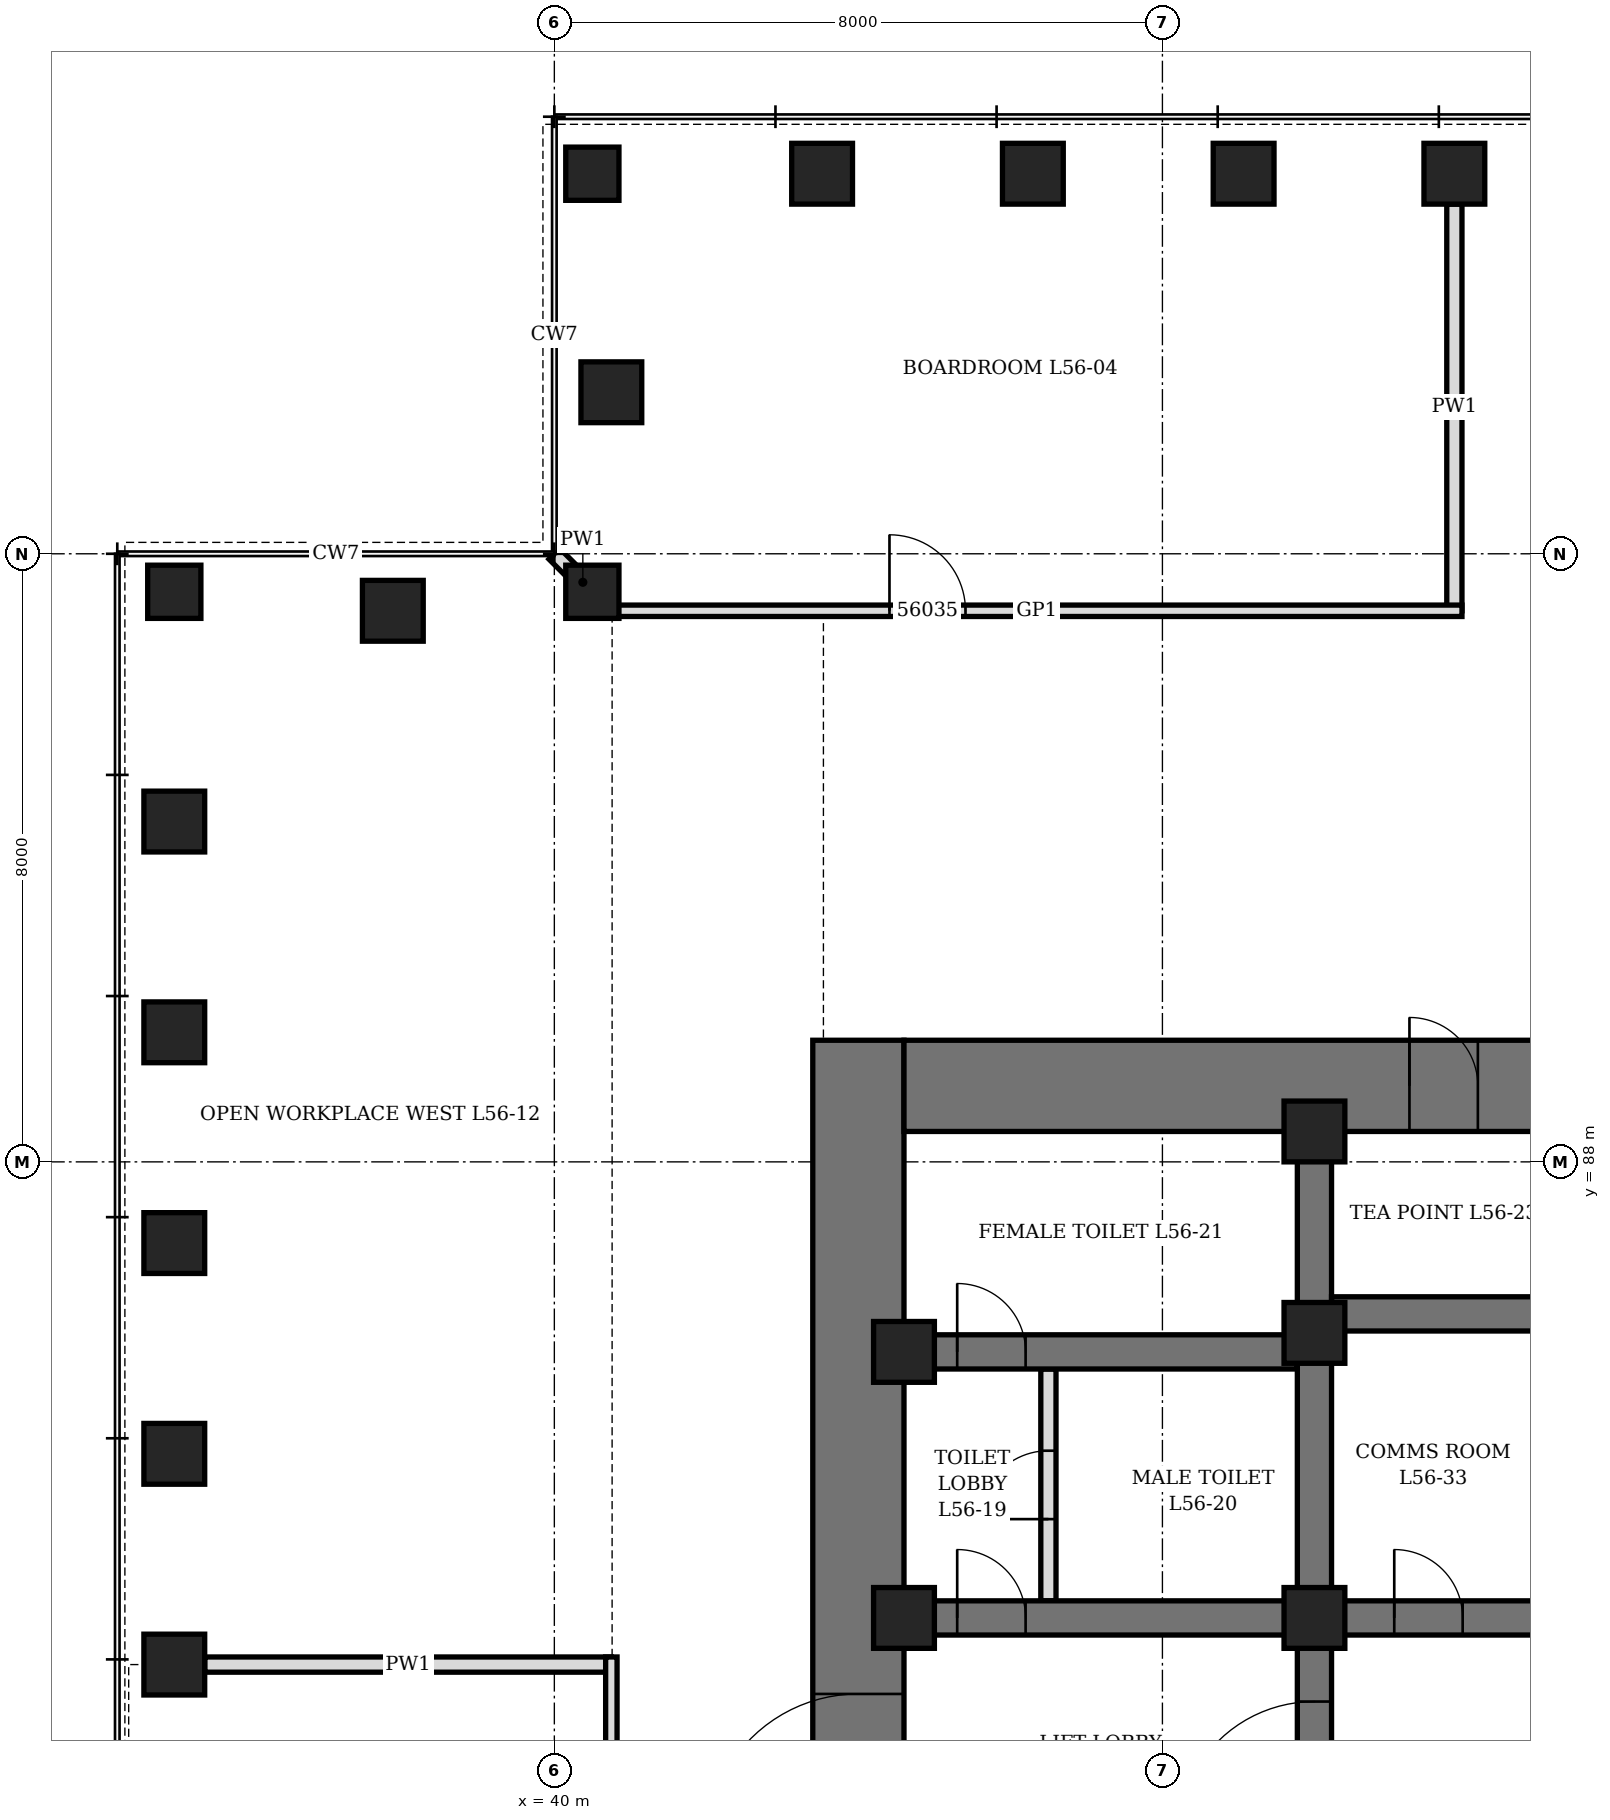
"""IFC4 building model, lengths in metres.
Left out: names, types, materials, properties, quantities, classifications, styles, units other than length and angle.
Written with IfcOpenShell. Run it as: python <this file> out.ifc"""

import sys

from ifc_helpers import new_model, si_unit, direction, frame, frame_2d, origin, origin_2d, place, context, subcontext, project, spatial, rectangle, hollow_rectangle, extrude, clip, halfspace, element, fill, save


model = new_model("IFC4")
c1 = context("Model", 3, precision=1e-05, world=origin(), true_north=direction((0.0, 1.0)))
c2 = subcontext(c1, "Body", "Model", "MODEL_VIEW")
j1 = project(units=[si_unit("LENGTHUNIT", "METRE"), si_unit("PLANEANGLEUNIT", "RADIAN")], contexts=[c1])
p1 = place(None, origin())
s1 = spatial("IfcSite", under=j1, at=p1, CompositionType="ELEMENT")
p2 = place(p1, origin())
s2 = spatial("IfcBuilding", under=s1, at=p2, CompositionType="ELEMENT")
p3 = place(p2, frame((0.0, 0.0, 250.3)))
s3 = spatial("IfcBuildingStorey", under=s2, at=p3, CompositionType="ELEMENT", Elevation=250.3)
for number, where, z_axis, x_axis in (
    (1, (51.841, 101.0, -0.16), (0.0, 0.0, 1.0), (1.0, 0.0, 0.0)),
    (2, (49.068, 101.0, -0.16), (0.0, 0.0, 1.0), (1.0, 0.0, 0.0)),
    (3, (46.295, 101.0, -0.16), (0.0, 0.0, 1.0), (1.0, 0.0, 0.0)),
    (4, (43.523, 101.0, -0.16), (0.0, 0.0, 1.0), (1.0, 0.0, 0.0)),
):
    element("IfcColumn", number, at=place(p3, frame(where, z_axis=z_axis, x_axis=x_axis)), inside=s3, PredefinedType="COLUMN", context=c2, shape_type="SweptSolid", body=[
        extrude(hollow_rectangle(XDim=0.8, YDim=0.8, WallThickness=0.1, at=origin_2d()), origin(), (0.0, 0.0, 1.0), 4.36),
    ])
p4 = place(p3, frame((40.5, 101.0, -0.16), z_axis=(0.057244014902, 0.0, 0.998360216935), x_axis=(0.0, 1.0, 0.0)))
e5 = element("IfcColumn", 5, at=p4, inside=s3, PredefinedType="COLUMN", context=c2, shape_type="Clipping", body=[
    clip(clip(extrude(hollow_rectangle(XDim=0.7, YDim=0.7, WallThickness=0.08, at=origin_2d()), origin(), (0.0, 0.0, 1.0), 4.367), halfspace(frame((0.0, 0.0, 0.022), z_axis=(0.0, 0.0, 1.0), x_axis=(1.0, 0.0, 0.0)), True)), halfspace(frame((0.0, 0.0, 4.345), z_axis=(0.0, 0.0, -1.0), x_axis=(1.0, 0.0, 0.0)), True)),
])
p5 = place(p3, frame((40.75, 98.125, -0.16), z_axis=(0.0, 0.0, 1.0), x_axis=(0.0, 1.0, 0.0)))
e6 = element("IfcColumn", 6, at=p5, inside=s3, PredefinedType="COLUMN", context=c2, shape_type="SweptSolid", body=[
    extrude(hollow_rectangle(XDim=0.8, YDim=0.8, WallThickness=0.1, at=origin_2d()), origin(), (0.0, 0.0, 1.0), 4.36),
])
p6 = place(p3, frame((40.5, 95.5, -0.16), z_axis=(0.057150453976, -0.057150453976, 0.99672847417), x_axis=(0.707106781187, 0.707106781187, 0.0)))
e7 = element("IfcColumn", 7, at=p6, inside=s3, PredefinedType="COLUMN", context=c2, shape_type="Clipping", body=[
    clip(clip(extrude(hollow_rectangle(XDim=0.7, YDim=0.7, WallThickness=0.08, at=origin_2d()), origin(), (0.0, 0.0, 1.0), 4.375), halfspace(frame((0.0, 0.0, 0.031), z_axis=(0.0, 0.0, 1.0), x_axis=(1.0, 0.0, 0.0)), True)), halfspace(frame((0.0, 0.0, 4.344), z_axis=(0.0, 0.0, -1.0), x_axis=(1.0, 0.0, 0.0)), True)),
])
p7 = place(p3, frame((37.875, 95.25, -0.16), z_axis=(0.0, 0.0, 1.0), x_axis=(1.0, 0.0, 0.0)))
e8 = element("IfcColumn", 8, at=p7, inside=s3, PredefinedType="COLUMN", context=c2, shape_type="SweptSolid", body=[
    extrude(hollow_rectangle(XDim=0.8, YDim=0.8, WallThickness=0.1, at=origin_2d()), origin(), (0.0, 0.0, 1.0), 4.36),
])
p8 = place(p3, frame((35.0, 95.5, -0.16), z_axis=(0.0, -0.057244014902, 0.998360216935), x_axis=(1.0, 0.0, 0.0)))
e9 = element("IfcColumn", 9, at=p8, inside=s3, PredefinedType="COLUMN", context=c2, shape_type="Clipping", body=[
    clip(clip(extrude(hollow_rectangle(XDim=0.7, YDim=0.7, WallThickness=0.08, at=origin_2d()), origin(), (0.0, 0.0, 1.0), 4.367), halfspace(frame((0.0, 0.0, 0.022), z_axis=(0.0, 0.0, 1.0), x_axis=(1.0, 0.0, 0.0)), True)), halfspace(frame((0.0, 0.0, 4.345), z_axis=(0.0, 0.0, -1.0), x_axis=(1.0, 0.0, 0.0)), True)),
])
for number, where, z_axis, x_axis in (
    (10, (35.0, 92.477, -0.16), (0.0, 0.0, 1.0), (0.0, 1.0, 0.0)),
    (11, (35.0, 89.705, -0.16), (0.0, 0.0, 1.0), (0.0, 1.0, 0.0)),
    (12, (35.0, 86.932, -0.16), (0.0, 0.0, 1.0), (0.0, 1.0, 0.0)),
    (13, (35.0, 84.159, -0.16), (0.0, 0.0, 1.0), (0.0, 1.0, 0.0)),
    (14, (35.0, 81.386, -0.16), (0.0, 0.0, 1.0), (0.0, 1.0, 0.0)),
):
    element("IfcColumn", number, at=place(p3, frame(where, z_axis=z_axis, x_axis=x_axis)), inside=s3, PredefinedType="COLUMN", context=c2, shape_type="SweptSolid", body=[
        extrude(hollow_rectangle(XDim=0.8, YDim=0.8, WallThickness=0.1, at=origin_2d()), origin(), (0.0, 0.0, 1.0), 4.36),
    ])
p9 = place(p3, frame((44.0, 70.4, 0.0), z_axis=(0.0, 0.0, 1.0), x_axis=(0.0, 1.0, 0.0)))
e15 = element("IfcWall", 15, at=p9, inside=s3, PredefinedType="SHEAR", context=c2, shape_type="SweptSolid", body=[
    extrude(rectangle(XDim=19.2, YDim=1.2, at=frame_2d((9.6, 0.0))), origin(), (0.0, 0.0, 1.0), 4.2),
])
p10 = place(p9, frame((8.6, 0.0, 0.0)))
e16 = element("IfcOpeningElement", 16, at=p10, cuts=e15, PredefinedType="OPENING", context=c2, shape_type="SweptSolid", body=[
    extrude(rectangle(XDim=2.0, YDim=2.4, at=frame_2d((1.0, 1.2))), frame((0.0, 0.61, 0.0), z_axis=(0.0, -1.0, 0.0), x_axis=(1.0, 0.0, 0.0)), (0.0, 0.0, 1.0), 1.22),
])
p11 = place(p3, frame((44.6, 89.0, 0.0), z_axis=(0.0, 0.0, 1.0), x_axis=(1.0, 0.0, 0.0)))
e17 = element("IfcWall", 17, at=p11, inside=s3, PredefinedType="SHEAR", context=c2, shape_type="SweptSolid", body=[
    extrude(rectangle(XDim=22.8, YDim=1.2, at=frame_2d((11.4, 0.0))), origin(), (0.0, 0.0, 1.0), 4.2),
])
p12 = place(p11, frame((9.475, 0.0, 0.0)))
e18 = element("IfcOpeningElement", 18, at=p12, cuts=e17, PredefinedType="OPENING", context=c2, shape_type="SweptSolid", body=[
    extrude(rectangle(XDim=1.0, YDim=2.1, at=frame_2d((0.5, 1.05))), frame((0.0, 0.61, 0.0), z_axis=(0.0, -1.0, 0.0), x_axis=(1.0, 0.0, 0.0)), (0.0, 0.0, 1.0), 1.22),
])
p13 = place(p11, frame((6.65, 0.0, 0.0)))
e19 = element("IfcOpeningElement", 19, at=p13, cuts=e17, PredefinedType="OPENING", context=c2, shape_type="SweptSolid", body=[
    extrude(rectangle(XDim=0.9, YDim=2.1, at=frame_2d((0.45, 1.05))), frame((0.0, 0.61, 0.0), z_axis=(0.0, -1.0, 0.0), x_axis=(1.0, 0.0, 0.0)), (0.0, 0.0, 1.0), 1.22),
])
p14 = place(p11, frame((13.012, 0.0, 0.0)))
e20 = element("IfcOpeningElement", 20, at=p14, cuts=e17, PredefinedType="OPENING", context=c2, shape_type="SweptSolid", body=[
    extrude(rectangle(XDim=0.9, YDim=2.1, at=frame_2d((0.45, 1.05))), frame((0.0, 0.61, 0.0), z_axis=(0.0, -1.0, 0.0), x_axis=(1.0, 0.0, 0.0)), (0.0, 0.0, 1.0), 1.22),
])
p15 = place(p3, frame((50.0, 71.6, 0.0), z_axis=(0.0, 0.0, 1.0), x_axis=(0.0, 1.0, 0.0)))
e21 = element("IfcWall", 21, at=p15, inside=s3, PredefinedType="SHEAR", context=c2, shape_type="SweptSolid", body=[
    extrude(rectangle(XDim=16.8, YDim=0.45, at=frame_2d((8.4, 0.0))), origin(), (0.0, 0.0, 1.0), 4.2),
])
p16 = place(p15, frame((7.5, 0.0, 0.0)))
e22 = element("IfcOpeningElement", 22, at=p16, cuts=e21, PredefinedType="OPENING", context=c2, shape_type="SweptSolid", body=[
    extrude(rectangle(XDim=1.8, YDim=2.4, at=frame_2d((0.9, 1.2))), frame((0.0, 0.235, 0.0), z_axis=(0.0, -1.0, 0.0), x_axis=(1.0, 0.0, 0.0)), (0.0, 0.0, 1.0), 0.47),
])
p17 = place(p3, frame((44.6, 82.0, 0.0), z_axis=(0.0, 0.0, 1.0), x_axis=(1.0, 0.0, 0.0)))
e23 = element("IfcWall", 23, at=p17, inside=s3, PredefinedType="SHEAR", context=c2, shape_type="SweptSolid", body=[
    extrude(rectangle(XDim=5.175, YDim=0.45, at=frame_2d((2.587, 0.0))), origin(), (0.0, 0.0, 1.0), 4.2),
])
p18 = place(p17, frame((0.7, 0.0, 0.0)))
e24 = element("IfcOpeningElement", 24, at=p18, cuts=e23, PredefinedType="OPENING", context=c2, shape_type="SweptSolid", body=[
    extrude(rectangle(XDim=0.9, YDim=2.1, at=frame_2d((0.45, 1.05))), frame((0.0, 0.235, 0.0), z_axis=(0.0, -1.0, 0.0), x_axis=(1.0, 0.0, 0.0)), (0.0, 0.0, 1.0), 0.47),
])
p19 = place(p3, frame((44.6, 85.5, 0.0), z_axis=(0.0, 0.0, 1.0), x_axis=(1.0, 0.0, 0.0)))
e25 = element("IfcWall", 25, at=p19, inside=s3, PredefinedType="SHEAR", context=c2, shape_type="SweptSolid", body=[
    extrude(rectangle(XDim=5.175, YDim=0.45, at=frame_2d((2.587, 0.0))), origin(), (0.0, 0.0, 1.0), 4.2),
])
p20 = place(p19, frame((0.7, 0.0, 0.0)))
e26 = element("IfcOpeningElement", 26, at=p20, cuts=e25, PredefinedType="OPENING", context=c2, shape_type="SweptSolid", body=[
    extrude(rectangle(XDim=0.9, YDim=2.1, at=frame_2d((0.45, 1.05))), frame((0.0, 0.235, 0.0), z_axis=(0.0, -1.0, 0.0), x_axis=(1.0, 0.0, 0.0)), (0.0, 0.0, 1.0), 0.47),
])
p21 = place(p3, frame((50.225, 82.0, 0.0), z_axis=(0.0, 0.0, 1.0), x_axis=(1.0, 0.0, 0.0)))
e27 = element("IfcWall", 27, at=p21, inside=s3, PredefinedType="SHEAR", context=c2, shape_type="SweptSolid", body=[
    extrude(rectangle(XDim=11.55, YDim=0.45, at=frame_2d((5.775, 0.0))), origin(), (0.0, 0.0, 1.0), 4.2),
])
p22 = place(p21, frame((0.825, 0.0, 0.0)))
e28 = element("IfcOpeningElement", 28, at=p22, cuts=e27, PredefinedType="OPENING", context=c2, shape_type="SweptSolid", body=[
    extrude(rectangle(XDim=0.9, YDim=2.1, at=frame_2d((0.45, 1.05))), frame((0.0, 0.235, 0.0), z_axis=(0.0, -1.0, 0.0), x_axis=(1.0, 0.0, 0.0)), (0.0, 0.0, 1.0), 0.47),
])
p23 = place(p21, frame((3.825, 0.0, 0.0)))
e29 = element("IfcOpeningElement", 29, at=p23, cuts=e27, PredefinedType="OPENING", context=c2, shape_type="SweptSolid", body=[
    extrude(rectangle(XDim=0.9, YDim=2.1, at=frame_2d((0.45, 1.05))), frame((0.0, 0.235, 0.0), z_axis=(0.0, -1.0, 0.0), x_axis=(1.0, 0.0, 0.0)), (0.0, 0.0, 1.0), 0.47),
])
p24 = place(p21, frame((6.825, 0.0, 0.0)))
e30 = element("IfcOpeningElement", 30, at=p24, cuts=e27, PredefinedType="OPENING", context=c2, shape_type="SweptSolid", body=[
    extrude(rectangle(XDim=0.9, YDim=2.1, at=frame_2d((0.45, 1.05))), frame((0.0, 0.235, 0.0), z_axis=(0.0, -1.0, 0.0), x_axis=(1.0, 0.0, 0.0)), (0.0, 0.0, 1.0), 0.47),
])
p25 = place(p21, frame((9.825, 0.0, 0.0)))
e31 = element("IfcOpeningElement", 31, at=p25, cuts=e27, PredefinedType="OPENING", context=c2, shape_type="SweptSolid", body=[
    extrude(rectangle(XDim=0.9, YDim=2.1, at=frame_2d((0.45, 1.05))), frame((0.0, 0.235, 0.0), z_axis=(0.0, -1.0, 0.0), x_axis=(1.0, 0.0, 0.0)), (0.0, 0.0, 1.0), 0.47),
])
p26 = place(p3, frame((50.225, 86.0, 0.0), z_axis=(0.0, 0.0, 1.0), x_axis=(1.0, 0.0, 0.0)))
e32 = element("IfcWall", 32, at=p26, inside=s3, PredefinedType="SHEAR", context=c2, shape_type="SweptSolid", body=[
    extrude(rectangle(XDim=11.55, YDim=0.45, at=frame_2d((5.775, 0.0))), origin(), (0.0, 0.0, 1.0), 4.2),
])
for number, where, z_axis, x_axis in (
    (33, (44.6, 82.0, 0.0), (0.0, 0.0, 1.0), (1.0, 0.0, 0.0)),
    (34, (44.6, 85.5, 0.0), (0.0, 0.0, 1.0), (1.0, 0.0, 0.0)),
    (35, (50.0, 82.0, 0.0), (0.0, 0.0, 1.0), (1.0, 0.0, 0.0)),
    (36, (50.0, 85.75, 0.0), (0.0, 0.0, 1.0), (1.0, 0.0, 0.0)),
    (37, (50.0, 88.4, 0.0), (0.0, 0.0, 1.0), (1.0, 0.0, 0.0)),
):
    element("IfcColumn", number, at=place(p3, frame(where, z_axis=z_axis, x_axis=x_axis)), inside=s3, PredefinedType="COLUMN", context=c2, shape_type="SweptSolid", body=[
        extrude(hollow_rectangle(XDim=0.8, YDim=0.8, WallThickness=0.1, at=origin_2d()), origin(), (0.0, 0.0, 1.0), 4.2),
    ])
p27 = place(p3, frame((46.5, 82.225, 0.0), z_axis=(0.0, 0.0, 1.0), x_axis=(0.0, 1.0, 0.0)))
e38 = element("IfcWall", 38, at=p27, inside=s3, PredefinedType="PARTITIONING", context=c2, shape_type="SweptSolid", body=[
    extrude(rectangle(XDim=3.05, YDim=0.2, at=frame_2d((1.525, 0.0))), origin(), (0.0, 0.0, 1.0), 4.04),
])
p28 = place(p27, frame((1.075, 0.0, 0.0)))
e39 = element("IfcOpeningElement", 39, at=p28, cuts=e38, PredefinedType="OPENING", context=c2, shape_type="SweptSolid", body=[
    extrude(rectangle(XDim=0.9, YDim=2.1, at=frame_2d((0.45, 1.05))), frame((0.0, 0.11, 0.0), z_axis=(0.0, -1.0, 0.0), x_axis=(1.0, 0.0, 0.0)), (0.0, 0.0, 1.0), 0.22),
])
for number, where, z_axis, x_axis in (
    (40, (51.841, 95.25, 0.0), (0.0, 0.0, 1.0), (0.0, 1.0, 0.0)),
    (41, (35.4, 81.386, 0.0), (0.0, 0.0, 1.0), (1.0, 0.0, 0.0)),
):
    element("IfcWall", number, at=place(p3, frame(where, z_axis=z_axis, x_axis=x_axis)), inside=s3, PredefinedType="PARTITIONING", context=c2, shape_type="SweptSolid", body=[
        extrude(rectangle(XDim=5.35, YDim=0.2, at=frame_2d((2.675, 0.0))), origin(), (0.0, 0.0, 1.0), 3.428),
    ])
p29 = place(p3, frame((40.75, 95.25, 0.0), z_axis=(0.0, 0.0, 1.0), x_axis=(1.0, 0.0, 0.0)))
e42 = element("IfcWall", 42, at=p29, inside=s3, PredefinedType="PARTITIONING", context=c2, shape_type="SweptSolid", body=[
    extrude(rectangle(XDim=11.191, YDim=0.15, at=frame_2d((5.595, 0.0))), origin(), (0.0, 0.0, 1.0), 4.04),
])
p30 = place(p29, frame((3.659, 0.0, 0.0)))
e43 = element("IfcOpeningElement", 43, at=p30, cuts=e42, PredefinedType="OPENING", context=c2, shape_type="SweptSolid", body=[
    extrude(rectangle(XDim=1.0, YDim=2.4, at=frame_2d((0.5, 1.2))), frame((0.0, 0.085, 0.0), z_axis=(0.0, -1.0, 0.0), x_axis=(1.0, 0.0, 0.0)), (0.0, 0.0, 1.0), 0.17),
])
p31 = place(p3, frame((40.75, 64.75, 0.0), z_axis=(0.0, 0.0, 1.0), x_axis=(0.0, 1.0, 0.0)))
e44 = element("IfcWall", 44, at=p31, inside=s3, PredefinedType="PARTITIONING", context=c2, shape_type="SweptSolid", body=[
    extrude(rectangle(XDim=16.736, YDim=0.15, at=frame_2d((8.368, 0.0))), origin(), (0.0, 0.0, 1.0), 4.04),
])
p32 = place(p31, frame((6.432, 0.0, 0.0)))
e45 = element("IfcOpeningElement", 45, at=p32, cuts=e44, PredefinedType="OPENING", context=c2, shape_type="SweptSolid", body=[
    extrude(rectangle(XDim=1.0, YDim=2.4, at=frame_2d((0.5, 1.2))), frame((0.0, 0.085, 0.0), z_axis=(0.0, -1.0, 0.0), x_axis=(1.0, 0.0, 0.0)), (0.0, 0.0, 1.0), 0.17),
])
p33 = place(p3, frame((40.75, 95.25, 0.0), z_axis=(0.0, 0.0, 1.0), x_axis=(-0.707106781187, 0.707106781187, 0.0)))
e46 = element("IfcWall", 46, at=p33, inside=s3, PredefinedType="PARTITIONING", context=c2, shape_type="SweptSolid", body=[
    extrude(rectangle(XDim=1.061, YDim=0.2, at=frame_2d((0.53, 0.0))), origin(), (0.0, 0.0, 1.0), 4.04),
])
p34 = place(p18, origin())
e47 = element("IfcDoor", 47, at=p34, inside=s3, OperationType="SINGLE_SWING_LEFT", PredefinedType="DOOR", context=c2, shape_type="SweptSolid", body=[
    extrude(rectangle(XDim=0.9, YDim=2.1, at=frame_2d((0.45, 1.05))), frame((0.0, 0.225, 0.0), z_axis=(0.0, -1.0, 0.0), x_axis=(1.0, 0.0, 0.0)), (0.0, 0.0, 1.0), 0.449),
])
fill(e24, e47)
p35 = place(p28, origin())
e48 = element("IfcDoor", 48, at=p35, inside=s3, OperationType="SINGLE_SWING_RIGHT", PredefinedType="DOOR", context=c2, shape_type="SweptSolid", body=[
    extrude(rectangle(XDim=0.9, YDim=2.1, at=frame_2d((0.45, 1.05))), frame((0.0, 0.1, 0.0), z_axis=(0.0, -1.0, 0.0), x_axis=(1.0, 0.0, 0.0)), (0.0, 0.0, 1.0), 0.199),
])
fill(e39, e48)
p36 = place(p20, origin())
e49 = element("IfcDoor", 49, at=p36, inside=s3, OperationType="SINGLE_SWING_RIGHT", PredefinedType="DOOR", context=c2, shape_type="SweptSolid", body=[
    extrude(rectangle(XDim=0.9, YDim=2.1, at=frame_2d((0.45, 1.05))), frame((0.0, 0.225, 0.0), z_axis=(0.0, -1.0, 0.0), x_axis=(1.0, 0.0, 0.0)), (0.0, 0.0, 1.0), 0.449),
])
fill(e26, e49)
p37 = place(p13, origin())
e50 = element("IfcDoor", 50, at=p37, inside=s3, OperationType="SINGLE_SWING_LEFT", PredefinedType="DOOR", context=c2, shape_type="SweptSolid", body=[
    extrude(rectangle(XDim=0.9, YDim=2.1, at=frame_2d((0.45, 1.05))), frame((0.0, 0.35, 0.0), z_axis=(0.0, -1.0, 0.0), x_axis=(1.0, 0.0, 0.0)), (0.0, 0.0, 1.0), 0.7),
])
fill(e19, e50)
p38 = place(p22, origin())
e51 = element("IfcDoor", 51, at=p38, inside=s3, OperationType="SINGLE_SWING_LEFT", PredefinedType="DOOR", context=c2, shape_type="SweptSolid", body=[
    extrude(rectangle(XDim=0.9, YDim=2.1, at=frame_2d((0.45, 1.05))), frame((0.0, 0.225, 0.0), z_axis=(0.0, -1.0, 0.0), x_axis=(1.0, 0.0, 0.0)), (0.0, 0.0, 1.0), 0.449),
])
fill(e28, e51)
p39 = place(p10, origin())
e52 = element("IfcDoor", 52, at=p39, inside=s3, OperationType="DOUBLE_DOOR_SINGLE_SWING", PredefinedType="DOOR", context=c2, shape_type="SweptSolid", body=[
    extrude(rectangle(XDim=2.0, YDim=2.4, at=frame_2d((1.0, 1.2))), frame((0.0, 0.35, 0.0), z_axis=(0.0, -1.0, 0.0), x_axis=(1.0, 0.0, 0.0)), (0.0, 0.0, 1.0), 0.7),
])
fill(e16, e52)
p40 = place(p16, origin())
e53 = element("IfcDoor", 53, at=p40, inside=s3, OperationType="DOUBLE_DOOR_SINGLE_SWING", PredefinedType="DOOR", context=c2, shape_type="SweptSolid", body=[
    extrude(rectangle(XDim=1.8, YDim=2.4, at=frame_2d((0.9, 1.2))), frame((0.0, 0.225, 0.0), z_axis=(0.0, -1.0, 0.0), x_axis=(1.0, 0.0, 0.0)), (0.0, 0.0, 1.0), 0.449),
])
fill(e22, e53)
p41 = place(p30, origin())
e54 = element("IfcDoor", 54, at=p41, inside=s3, OperationType="SINGLE_SWING_RIGHT", PredefinedType="DOOR", context=c2, shape_type="SweptSolid", body=[
    extrude(rectangle(XDim=1.0, YDim=2.4, at=frame_2d((0.5, 1.2))), frame((0.0, 0.075, 0.0), z_axis=(0.0, -1.0, 0.0), x_axis=(1.0, 0.0, 0.0)), (0.0, 0.0, 1.0), 0.149),
])
fill(e43, e54)
save(model, sys.argv[1])
